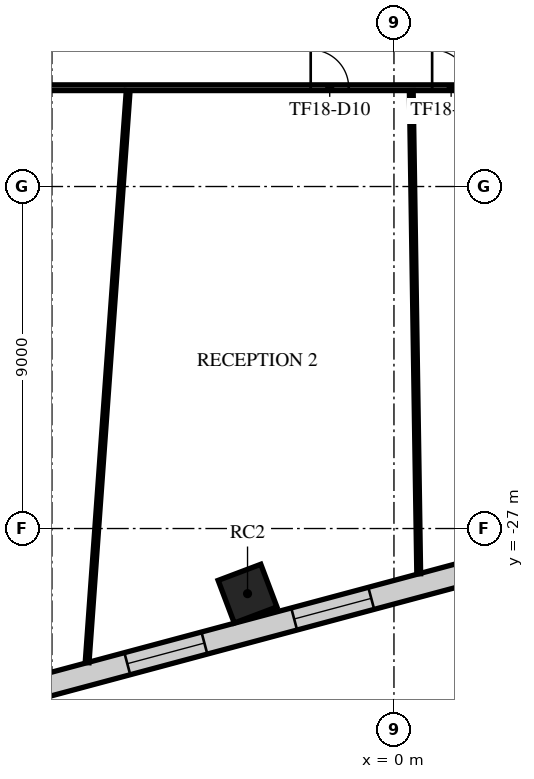
"""IFC4 building model, lengths in metres.
Left out: names, types, materials, properties, quantities, classifications, styles, units other than length and angle.
Written with IfcOpenShell. Run it as: python <this file> out.ifc"""

import sys

from ifc_helpers import new_model, si_unit, direction, frame, frame_2d, origin, origin_2d, place, context, subcontext, project, spatial, rectangle, extrude, element, fill, save


model = new_model("IFC4")
c1 = context("Model", 3, precision=1e-05, world=origin(), true_north=direction((0.0, 1.0)))
c2 = subcontext(c1, "Body", "Model", "MODEL_VIEW")
j1 = project(units=[si_unit("LENGTHUNIT", "METRE"), si_unit("PLANEANGLEUNIT", "RADIAN")], contexts=[c1])
p1 = place(None, origin())
s1 = spatial("IfcSite", under=j1, at=p1, CompositionType="ELEMENT")
p2 = place(p1, origin())
s2 = spatial("IfcBuilding", under=s1, at=p2, CompositionType="ELEMENT")
p3 = place(p2, frame((0.0, 0.0, 86.1)))
s3 = spatial("IfcBuildingStorey", under=s2, at=p3, CompositionType="ELEMENT", Elevation=86.1)
p4 = place(p3, frame((-3.853, -28.714, 0.0), z_axis=(0.0, 0.0, 1.0), x_axis=(0.935491525991, 0.353349125935, 0.0)))
e1 = element("IfcColumn", 1, at=p4, inside=s3, PredefinedType="COLUMN", context=c2, shape_type="SweptSolid", body=[
    extrude(rectangle(XDim=1.2, YDim=1.2, at=origin_2d()), origin(), (0.0, 0.0, 1.0), 4.0),
])
p5 = place(p3, frame((-16.859, -33.195, 0.0), z_axis=(0.0, 0.0, 1.0), x_axis=(0.965925643605, 0.258819726887, 0.0)))
e2 = element("IfcWall", 2, at=p5, inside=s3, PredefinedType="STANDARD", context=c2, shape_type="SweptSolid", body=[
    extrude(rectangle(XDim=49.752, YDim=0.6, at=frame_2d((24.876, 0.0))), origin(), (0.0, 0.0, 1.0), 3.58),
])
p6 = place(p5, frame((1.161, 0.0, 0.9)))
e3 = element("IfcOpeningElement", 3, at=p6, cuts=e2, PredefinedType="OPENING", context=c2, shape_type="SweptSolid", body=[
    extrude(rectangle(XDim=2.1, YDim=2.1, at=frame_2d((1.05, 1.05))), frame((0.0, 0.31, 0.0), z_axis=(0.0, -1.0, 0.0), x_axis=(1.0, 0.0, 0.0)), (0.0, 0.0, 1.0), 0.62),
])
p7 = place(p5, frame((5.644, 0.0, 0.9)))
e4 = element("IfcOpeningElement", 4, at=p7, cuts=e2, PredefinedType="OPENING", context=c2, shape_type="SweptSolid", body=[
    extrude(rectangle(XDim=2.1, YDim=2.1, at=frame_2d((1.05, 1.05))), frame((0.0, 0.31, 0.0), z_axis=(0.0, -1.0, 0.0), x_axis=(1.0, 0.0, 0.0)), (0.0, 0.0, 1.0), 0.62),
])
p8 = place(p5, frame((10.189, 0.0, 0.9)))
e5 = element("IfcOpeningElement", 5, at=p8, cuts=e2, PredefinedType="OPENING", context=c2, shape_type="SweptSolid", body=[
    extrude(rectangle(XDim=2.1, YDim=2.1, at=frame_2d((1.05, 1.05))), frame((0.0, 0.31, 0.0), z_axis=(0.0, -1.0, 0.0), x_axis=(1.0, 0.0, 0.0)), (0.0, 0.0, 1.0), 0.62),
])
p9 = place(p5, frame((14.735, 0.0, 0.9)))
e6 = element("IfcOpeningElement", 6, at=p9, cuts=e2, PredefinedType="OPENING", context=c2, shape_type="SweptSolid", body=[
    extrude(rectangle(XDim=2.1, YDim=2.1, at=frame_2d((1.05, 1.05))), frame((0.0, 0.31, 0.0), z_axis=(0.0, -1.0, 0.0), x_axis=(1.0, 0.0, 0.0)), (0.0, 0.0, 1.0), 0.62),
])
p10 = place(p5, frame((19.28, 0.0, 0.9)))
e7 = element("IfcOpeningElement", 7, at=p10, cuts=e2, PredefinedType="OPENING", context=c2, shape_type="SweptSolid", body=[
    extrude(rectangle(XDim=2.1, YDim=2.1, at=frame_2d((1.05, 1.05))), frame((0.0, 0.31, 0.0), z_axis=(0.0, -1.0, 0.0), x_axis=(1.0, 0.0, 0.0)), (0.0, 0.0, 1.0), 0.62),
])
p11 = place(p5, frame((23.826, 0.0, 0.9)))
e8 = element("IfcOpeningElement", 8, at=p11, cuts=e2, PredefinedType="OPENING", context=c2, shape_type="SweptSolid", body=[
    extrude(rectangle(XDim=2.1, YDim=2.1, at=frame_2d((1.05, 1.05))), frame((0.0, 0.31, 0.0), z_axis=(0.0, -1.0, 0.0), x_axis=(1.0, 0.0, 0.0)), (0.0, 0.0, 1.0), 0.62),
])
p12 = place(p5, frame((28.371, 0.0, 0.9)))
e9 = element("IfcOpeningElement", 9, at=p12, cuts=e2, PredefinedType="OPENING", context=c2, shape_type="SweptSolid", body=[
    extrude(rectangle(XDim=2.1, YDim=2.1, at=frame_2d((1.05, 1.05))), frame((0.0, 0.31, 0.0), z_axis=(0.0, -1.0, 0.0), x_axis=(1.0, 0.0, 0.0)), (0.0, 0.0, 1.0), 0.62),
])
p13 = place(p5, frame((32.917, 0.0, 0.9)))
e10 = element("IfcOpeningElement", 10, at=p13, cuts=e2, PredefinedType="OPENING", context=c2, shape_type="SweptSolid", body=[
    extrude(rectangle(XDim=2.1, YDim=2.1, at=frame_2d((1.05, 1.05))), frame((0.0, 0.31, 0.0), z_axis=(0.0, -1.0, 0.0), x_axis=(1.0, 0.0, 0.0)), (0.0, 0.0, 1.0), 0.62),
])
p14 = place(p5, frame((37.462, 0.0, 0.9)))
e11 = element("IfcOpeningElement", 11, at=p14, cuts=e2, PredefinedType="OPENING", context=c2, shape_type="SweptSolid", body=[
    extrude(rectangle(XDim=2.1, YDim=2.1, at=frame_2d((1.05, 1.05))), frame((0.0, 0.31, 0.0), z_axis=(0.0, -1.0, 0.0), x_axis=(1.0, 0.0, 0.0)), (0.0, 0.0, 1.0), 0.62),
])
p15 = place(p5, frame((42.008, 0.0, 0.9)))
e12 = element("IfcOpeningElement", 12, at=p15, cuts=e2, PredefinedType="OPENING", context=c2, shape_type="SweptSolid", body=[
    extrude(rectangle(XDim=2.1, YDim=2.1, at=frame_2d((1.05, 1.05))), frame((0.0, 0.31, 0.0), z_axis=(0.0, -1.0, 0.0), x_axis=(1.0, 0.0, 0.0)), (0.0, 0.0, 1.0), 0.62),
])
p16 = place(p5, frame((46.491, 0.0, 0.9)))
e13 = element("IfcOpeningElement", 13, at=p16, cuts=e2, PredefinedType="OPENING", context=c2, shape_type="SweptSolid", body=[
    extrude(rectangle(XDim=2.1, YDim=2.1, at=frame_2d((1.05, 1.05))), frame((0.0, 0.31, 0.0), z_axis=(0.0, -1.0, 0.0), x_axis=(1.0, 0.0, 0.0)), (0.0, 0.0, 1.0), 0.62),
])
p17 = place(p3, frame((-15.325, -15.4, 0.0), z_axis=(0.0, 0.0, 1.0), x_axis=(1.0, 0.0, 0.0)))
e14 = element("IfcWall", 14, at=p17, inside=s3, PredefinedType="PARTITIONING", context=c2, shape_type="SweptSolid", body=[
    extrude(rectangle(XDim=30.725, YDim=0.15, at=frame_2d((15.362, 0.0))), origin(), (0.0, 0.0, 1.0), 3.08),
])
p18 = place(p17, frame((1.8, 0.0, 0.0)))
e15 = element("IfcOpeningElement", 15, at=p18, cuts=e14, PredefinedType="OPENING", context=c2, shape_type="SweptSolid", body=[
    extrude(rectangle(XDim=1.8, YDim=2.1, at=frame_2d((0.9, 1.05))), frame((0.0, 0.085, 0.0), z_axis=(0.0, -1.0, 0.0), x_axis=(1.0, 0.0, 0.0)), (0.0, 0.0, 1.0), 0.17),
])
p19 = place(p17, frame((13.134, 0.0, 0.0)))
e16 = element("IfcOpeningElement", 16, at=p19, cuts=e14, PredefinedType="OPENING", context=c2, shape_type="SweptSolid", body=[
    extrude(rectangle(XDim=1.0, YDim=2.1, at=frame_2d((0.5, 1.05))), frame((0.0, 0.085, 0.0), z_axis=(0.0, -1.0, 0.0), x_axis=(1.0, 0.0, 0.0)), (0.0, 0.0, 1.0), 0.17),
])
p20 = place(p17, frame((16.329, 0.0, 0.0)))
e17 = element("IfcOpeningElement", 17, at=p20, cuts=e14, PredefinedType="OPENING", context=c2, shape_type="SweptSolid", body=[
    extrude(rectangle(XDim=1.0, YDim=2.1, at=frame_2d((0.5, 1.05))), frame((0.0, 0.085, 0.0), z_axis=(0.0, -1.0, 0.0), x_axis=(1.0, 0.0, 0.0)), (0.0, 0.0, 1.0), 0.17),
])
p21 = place(p17, frame((24.208, 0.0, 0.0)))
e18 = element("IfcOpeningElement", 18, at=p21, cuts=e14, PredefinedType="OPENING", context=c2, shape_type="SweptSolid", body=[
    extrude(rectangle(XDim=1.0, YDim=2.1, at=frame_2d((0.5, 1.05))), frame((0.0, 0.085, 0.0), z_axis=(0.0, -1.0, 0.0), x_axis=(1.0, 0.0, 0.0)), (0.0, 0.0, 1.0), 0.17),
])
p22 = place(p3, frame((-8.074, -30.528, 0.0), z_axis=(0.0, 0.0, 1.0), x_axis=(0.071616164184, 0.997432265885, 0.0)))
e19 = element("IfcWall", 19, at=p22, inside=s3, PredefinedType="PARTITIONING", context=c2, shape_type="SweptSolid", body=[
    extrude(rectangle(XDim=15.088, YDim=0.1, at=frame_2d((7.544, 0.0))), origin(), (0.0, 0.0, 1.0), 3.58),
])
p23 = place(p3, frame((0.455, -15.476, 0.0), z_axis=(0.0, 0.0, 1.0), x_axis=(0.015436837746, -0.999880844921, 0.0)))
e20 = element("IfcWall", 20, at=p23, inside=s3, PredefinedType="PARTITIONING", context=c2, shape_type="SweptSolid", body=[
    extrude(rectangle(XDim=12.716, YDim=0.1, at=frame_2d((6.358, 0.0))), origin(), (0.0, 0.0, 1.0), 3.58),
])
p24 = place(p8, origin())
e21 = element("IfcWindow", 21, at=p24, inside=s3, PartitioningType="SINGLE_PANEL", PredefinedType="WINDOW", context=c2, shape_type="SweptSolid", body=[
    extrude(rectangle(XDim=2.1, YDim=2.1, at=frame_2d((1.05, 1.05))), frame((0.0, 0.03, 0.0), z_axis=(0.0, -1.0, 0.0), x_axis=(1.0, 0.0, 0.0)), (0.0, 0.0, 1.0), 0.06),
])
fill(e5, e21)
p25 = place(p9, origin())
e22 = element("IfcWindow", 22, at=p25, inside=s3, PartitioningType="SINGLE_PANEL", PredefinedType="WINDOW", context=c2, shape_type="SweptSolid", body=[
    extrude(rectangle(XDim=2.1, YDim=2.1, at=frame_2d((1.05, 1.05))), frame((0.0, 0.03, 0.0), z_axis=(0.0, -1.0, 0.0), x_axis=(1.0, 0.0, 0.0)), (0.0, 0.0, 1.0), 0.06),
])
fill(e6, e22)
p26 = place(p19, frame((1.0, 0.0, 0.0), z_axis=(0.0, 0.0, 1.0), x_axis=(-1.0, 0.0, 0.0)))
e23 = element("IfcDoor", 23, at=p26, inside=s3, OperationType="SINGLE_SWING_LEFT", PredefinedType="DOOR", context=c2, shape_type="SweptSolid", body=[
    extrude(rectangle(XDim=1.0, YDim=2.1, at=frame_2d((0.5, 1.05))), frame((0.0, 0.025, 0.0), z_axis=(0.0, -1.0, 0.0), x_axis=(1.0, 0.0, 0.0)), (0.0, 0.0, 1.0), 0.05),
])
fill(e16, e23)
p27 = place(p20, frame((1.0, 0.0, 0.0), z_axis=(0.0, 0.0, 1.0), x_axis=(-1.0, 0.0, 0.0)))
e24 = element("IfcDoor", 24, at=p27, inside=s3, OperationType="SINGLE_SWING_RIGHT", PredefinedType="DOOR", context=c2, shape_type="SweptSolid", body=[
    extrude(rectangle(XDim=1.0, YDim=2.1, at=frame_2d((0.5, 1.05))), frame((0.0, 0.025, 0.0), z_axis=(0.0, -1.0, 0.0), x_axis=(1.0, 0.0, 0.0)), (0.0, 0.0, 1.0), 0.05),
])
fill(e17, e24)
save(model, sys.argv[1])
